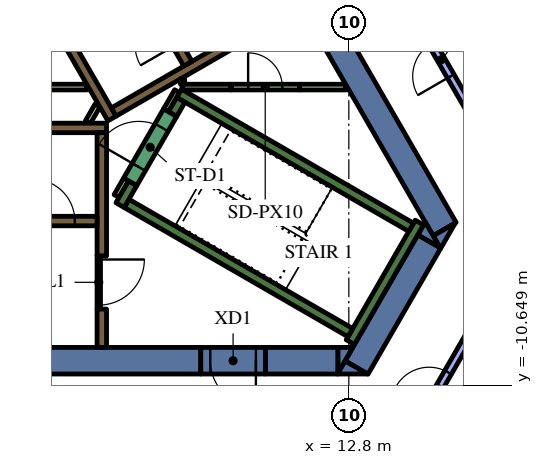
"""IFC4 building model, lengths in metres.
Left out: names, types, materials, properties, quantities, classifications, styles, units other than length and angle.
Written with IfcOpenShell. Run it as: python <this file> out.ifc"""

import sys

from ifc_helpers import new_model, si_unit, direction, frame, frame_2d, origin, place, context, subcontext, project, spatial, polyline, rectangle, outline, extrude, element, fill, save


model = new_model("IFC4")
c1 = context("Model", 3, precision=1e-05, world=origin(), true_north=direction((0.0, 1.0)))
c2 = subcontext(c1, "Body", "Model", "MODEL_VIEW")
j1 = project(units=[si_unit("LENGTHUNIT", "METRE"), si_unit("PLANEANGLEUNIT", "RADIAN")], contexts=[c1])
p1 = place(None, origin())
s1 = spatial("IfcSite", under=j1, at=p1, CompositionType="ELEMENT")
p2 = place(p1, origin())
s2 = spatial("IfcBuilding", under=s1, at=p2, CompositionType="ELEMENT")
p3 = place(p2, frame((0.0, 0.0, 210.0)))
s3 = spatial("IfcBuildingStorey", under=s2, at=p3, CompositionType="ELEMENT", Elevation=210.0)
p4 = place(p3, frame((9.085, 4.264, 0.0), z_axis=(0.0, 0.0, 1.0), x_axis=(0.499998082512, -0.866026510844, 0.0)))
e1 = element("IfcWall", 1, at=p4, inside=s3, PredefinedType="SOLIDWALL", context=c2, shape_type="SweptSolid", body=[
    extrude(rectangle(XDim=12.472, YDim=0.7, at=frame_2d((6.236, 0.0))), origin(), (0.0, 0.0, 1.0), 4.2),
])
p5 = place(p3, origin())
e2 = element("IfcWall", 2, at=p5, inside=s3, PredefinedType="SOLIDWALL", context=c2, shape_type="SweptSolid", body=[
    extrude(outline(polyline([(15.213, -7.05), (15.019, -6.714), (15.601, -6.378), (15.213, -7.05)])), origin(), (0.0, 0.0, 1.0), 4.2),
])
p6 = place(p3, frame((13.003, -10.179, 0.0), z_axis=(0.0, 0.0, 1.0), x_axis=(0.499972675833, 0.866041178825, 0.0)))
e3 = element("IfcWall", 3, at=p6, inside=s3, PredefinedType="SOLIDWALL", context=c2, shape_type="SweptSolid", body=[
    extrude(rectangle(XDim=3.829, YDim=0.7, at=frame_2d((1.915, 0.0))), origin(), (0.0, 0.0, 1.0), 4.2),
])
e4 = element("IfcWall", 4, at=p5, inside=s3, PredefinedType="SOLIDWALL", context=c2, shape_type="SweptSolid", body=[
    extrude(outline(polyline([(12.698, -10.005), (13.296, -10.35), (12.5, -10.35), (12.698, -10.005)])), origin(), (0.0, 0.0, 1.0), 4.2),
])
e5 = element("IfcWall", 5, at=p5, inside=s3, PredefinedType="SOLIDWALL", context=c2, shape_type="SweptSolid", body=[
    extrude(outline(polyline([(14.809, -6.35), (15.197, -7.022), (14.615, -6.686), (14.809, -6.35)])), origin(), (0.0, 0.0, 1.0), 4.2),
])
p7 = place(p3, frame((10.604, -10.0, 0.0), z_axis=(0.0, 0.0, 1.0), x_axis=(1.0, 0.0, 0.0)))
e6 = element("IfcWall", 6, at=p7, inside=s3, PredefinedType="SOLIDWALL", context=c2, shape_type="SweptSolid", body=[
    extrude(rectangle(XDim=1.909, YDim=0.7, at=frame_2d((0.955, 0.0))), origin(), (0.0, 0.0, 1.0), 4.2),
])
e7 = element("IfcWall", 7, at=p5, inside=s3, PredefinedType="SOLIDWALL", context=c2, shape_type="SweptSolid", body=[
    extrude(outline(polyline([(12.904, -9.65), (12.516, -10.322), (12.516, -9.65), (12.904, -9.65)])), origin(), (0.0, 0.0, 1.0), 4.2),
])
p8 = place(p3, frame((-10.556, -10.0, 0.0), z_axis=(0.0, 0.0, 1.0), x_axis=(1.0, 0.0, 0.0)))
e8 = element("IfcWall", 8, at=p8, inside=s3, PredefinedType="SOLIDWALL", context=c2, shape_type="SweptSolid", body=[
    extrude(rectangle(XDim=19.461, YDim=0.7, at=frame_2d((9.73, 0.0))), origin(), (0.0, 0.0, 1.0), 4.2),
])
p9 = place(p3, frame((12.84, -9.511, 0.0), z_axis=(0.0, 0.0, 1.0), x_axis=(0.500048121057, 0.865997619297, 0.0)))
e9 = element("IfcWall", 9, at=p9, inside=s3, PredefinedType="SOLIDWALL", context=c2, shape_type="SweptSolid", body=[
    extrude(rectangle(XDim=3.634, YDim=0.25, at=frame_2d((1.817, 0.0))), origin(), (0.0, 0.0, 1.0), 4.2),
])
p10 = place(p3, frame((12.84, -9.261, 0.0), z_axis=(0.0, 0.0, 1.0), x_axis=(-0.866013990052, 0.500019768644, 0.0)))
e10 = element("IfcWall", 10, at=p10, inside=s3, PredefinedType="SOLIDWALL", context=c2, shape_type="SweptSolid", body=[
    extrude(rectangle(XDim=6.8, YDim=0.25, at=frame_2d((3.4, 0.0))), origin(), (0.0, 0.0, 1.0), 4.2),
])
p11 = place(p3, frame((7.113, -5.33, 0.0), z_axis=(0.0, 0.0, 1.0), x_axis=(-0.499965889992, -0.866045096311, 0.0)))
e11 = element("IfcWall", 11, at=p11, inside=s3, PredefinedType="SOLIDWALL", context=c2, shape_type="SweptSolid", body=[
    extrude(rectangle(XDim=0.666, YDim=0.25, at=frame_2d((0.333, 0.0))), origin(), (0.0, 0.0, 1.0), 4.2),
])
p12 = place(p3, frame((8.334, -2.964, 0.0), z_axis=(0.0, 0.0, 1.0), x_axis=(0.866016039709, -0.500016218704, 0.0)))
e12 = element("IfcWall", 12, at=p12, inside=s3, PredefinedType="SOLIDWALL", context=c2, shape_type="SweptSolid", body=[
    extrude(rectangle(XDim=7.05, YDim=0.25, at=frame_2d((3.525, 0.0))), origin(), (0.0, 0.0, 1.0), 4.2),
])
p13 = place(p3, frame((8.163, -3.511, 0.0), z_axis=(0.0, 0.0, 1.0), x_axis=(0.500127794843, 0.865951608824, 0.0)))
e13 = element("IfcWall", 13, at=p13, inside=s3, PredefinedType="SOLIDWALL", context=c2, shape_type="SweptSolid", body=[
    extrude(rectangle(XDim=0.435, YDim=0.25, at=frame_2d((0.217, 0.0))), origin(), (0.0, 0.0, 1.0), 4.2),
])
p14 = place(p3, frame((-5.806, -3.875, 0.0), z_axis=(0.0, 0.0, 1.0), x_axis=(1.0, 0.0, 0.0)))
e14 = element("IfcWall", 14, at=p14, inside=s3, PredefinedType="SOLIDWALL", context=c2, shape_type="SweptSolid", body=[
    extrude(rectangle(XDim=12.231, YDim=0.25, at=frame_2d((6.116, 0.0))), origin(), (0.0, 0.0, 1.0), 4.2),
])
p15 = place(p3, frame((6.3, -7.24, 0.0), z_axis=(0.0, 0.0, 1.0), x_axis=(0.0, 1.0, 0.0)))
e15 = element("IfcWall", 15, at=p15, inside=s3, PredefinedType="SOLIDWALL", context=c2, shape_type="SweptSolid", body=[
    extrude(rectangle(XDim=3.24, YDim=0.25, at=frame_2d((1.62, 0.0))), origin(), (0.0, 0.0, 1.0), 4.2),
])
p16 = place(p3, frame((6.3, -9.65, 0.0), z_axis=(0.0, 0.0, 1.0), x_axis=(0.0, 1.0, 0.0)))
e16 = element("IfcWall", 16, at=p16, inside=s3, PredefinedType="SOLIDWALL", context=c2, shape_type="SweptSolid", body=[
    extrude(rectangle(XDim=1.008, YDim=0.25, at=frame_2d((0.504, 0.0))), origin(), (0.0, 0.0, 1.0), 4.2),
])
e17 = element("IfcWall", 17, at=p5, inside=s3, PredefinedType="SOLIDWALL", context=c2, shape_type="SweptSolid", body=[
    extrude(outline(polyline([(0.332, 6.925), (0.335, 6.925), (0.335, 6.925), (0.335, 6.925), (0.335, 7.075), (0.335, 7.075), (0.335, 7.075), (0.245, 7.075), (0.035, 7.439), (0.252, 7.564), (0.377, 7.348), (1.512, 5.382), (1.637, 5.165), (2.221, 4.153), (2.771, 3.199), (2.896, 2.983), (3.138, 2.564), (4.031, 1.017), (4.156, 0.801), (5.292, -1.165), (5.417, -1.382), (6.073, -2.519), (6.552, -3.348), (6.677, -3.564), (6.46, -3.689), (0.332, 6.925)])), origin(), (0.0, 0.0, 1.0), 4.2),
])
p17 = place(p3, frame((11.507, -0.631, 0.0), z_axis=(0.0, 0.0, 1.0), x_axis=(-0.866011447264, -0.500024172624, 0.0)))
e18 = element("IfcWall", 18, at=p17, inside=s3, PredefinedType="SOLIDWALL", context=c2, shape_type="SweptSolid", body=[
    extrude(rectangle(XDim=5.65, YDim=0.25, at=frame_2d((2.825, 0.0))), origin(), (0.0, 0.0, 1.0), 4.2),
])
p18 = place(p3, frame((3.238, -2.8, 0.0), z_axis=(0.0, 0.0, 1.0), x_axis=(1.0, 0.0, 0.0)))
e19 = element("IfcWall", 19, at=p18, inside=s3, PredefinedType="PARTITIONING", context=c2, shape_type="SweptSolid", body=[
    extrude(rectangle(XDim=2.672, YDim=0.15, at=frame_2d((1.336, 0.0))), origin(), (0.0, 0.0, 1.0), 3.45),
])
p19 = place(p3, frame((8.412, -2.8, 0.0), z_axis=(0.0, 0.0, 1.0), x_axis=(1.0, 0.0, 0.0)))
e20 = element("IfcWall", 20, at=p19, inside=s3, PredefinedType="PARTITIONING", context=c2, shape_type="SweptSolid", body=[
    extrude(rectangle(XDim=1.288, YDim=0.15, at=frame_2d((0.644, 0.0))), origin(), (0.0, 0.0, 1.0), 4.2),
])
p20 = place(p3, frame((8.37, -2.65, 0.0), z_axis=(0.0, 0.0, 1.0), x_axis=(1.0, 0.0, 0.0)))
e21 = element("IfcWall", 21, at=p20, inside=s3, PredefinedType="PARTITIONING", context=c2, shape_type="SweptSolid", body=[
    extrude(rectangle(XDim=0.108, YDim=0.15, at=frame_2d((0.054, 0.0))), origin(), (0.0, 0.0, 1.0), 4.2),
])
p21 = place(p3, frame((8.281, -2.907, 0.0), z_axis=(0.0, 0.0, 1.0), x_axis=(-0.500193841991, -0.86591346013, 0.0)))
e22 = element("IfcWall", 22, at=p21, inside=s3, PredefinedType="PARTITIONING", context=c2, shape_type="SweptSolid", body=[
    extrude(rectangle(XDim=0.583, YDim=0.15, at=frame_2d((0.292, 0.0))), origin(), (0.0, 0.0, 1.0), 4.2),
])
p22 = place(p3, frame((11.5, -2.801, 0.0), z_axis=(0.0, 0.0, 1.0), x_axis=(1.0, 0.0, 0.0)))
e23 = element("IfcWall", 23, at=p22, inside=s3, PredefinedType="PARTITIONING", context=c2, shape_type="SweptSolid", body=[
    extrude(rectangle(XDim=1.222, YDim=0.15, at=frame_2d((0.611, 0.0))), origin(), (0.0, 0.0, 1.0), 3.45),
])
p23 = place(p3, frame((6.688, -5.667, 0.0), z_axis=(0.0, 0.0, 1.0), x_axis=(0.499834152157, 0.86612113491, 0.0)))
e24 = element("IfcWall", 24, at=p23, inside=s3, PredefinedType="PARTITIONING", context=c2, shape_type="SweptSolid", body=[
    extrude(rectangle(XDim=0.505, YDim=0.15, at=frame_2d((0.252, 0.0))), origin(), (0.0, 0.0, 1.0), 3.45),
])
p24 = place(p3, frame((5.936, -3.718, 0.0), z_axis=(0.0, 0.0, 1.0), x_axis=(0.499890179513, 0.866088799389, 0.0)))
e25 = element("IfcWall", 25, at=p24, inside=s3, PredefinedType="PARTITIONING", context=c2, shape_type="SweptSolid", body=[
    extrude(rectangle(XDim=0.504, YDim=0.15, at=frame_2d((0.252, 0.0))), origin(), (0.0, 0.0, 1.0), 3.45),
])
p25 = place(p3, frame((-6.175, -6.325, 0.0), z_axis=(0.0, 0.0, 1.0), x_axis=(1.0, 0.0, 0.0)))
e26 = element("IfcWall", 26, at=p25, inside=s3, PredefinedType="SOLIDWALL", context=c2, shape_type="SweptSolid", body=[
    extrude(rectangle(XDim=12.35, YDim=0.25, at=frame_2d((6.175, 0.0))), origin(), (0.0, 0.0, 1.0), 4.2),
])
p26 = place(p25, frame((0.585, 0.0, 0.0)))
e27 = element("IfcOpeningElement", 27, at=p26, cuts=e26, PredefinedType="OPENING", context=c2, shape_type="SweptSolid", body=[
    extrude(rectangle(XDim=1.1, YDim=2.1, at=frame_2d((0.55, 1.05))), frame((0.0, 0.135, 0.0), z_axis=(0.0, -1.0, 0.0), x_axis=(1.0, 0.0, 0.0)), (0.0, 0.0, 1.0), 0.27),
])
p27 = place(p25, frame((3.105, 0.0, 0.0)))
e28 = element("IfcOpeningElement", 28, at=p27, cuts=e26, PredefinedType="OPENING", context=c2, shape_type="SweptSolid", body=[
    extrude(rectangle(XDim=1.1, YDim=2.1, at=frame_2d((0.55, 1.05))), frame((0.0, 0.135, 0.0), z_axis=(0.0, -1.0, 0.0), x_axis=(1.0, 0.0, 0.0)), (0.0, 0.0, 1.0), 0.27),
])
p28 = place(p25, frame((5.625, 0.0, 0.0)))
e29 = element("IfcOpeningElement", 29, at=p28, cuts=e26, PredefinedType="OPENING", context=c2, shape_type="SweptSolid", body=[
    extrude(rectangle(XDim=1.1, YDim=2.1, at=frame_2d((0.55, 1.05))), frame((0.0, 0.135, 0.0), z_axis=(0.0, -1.0, 0.0), x_axis=(1.0, 0.0, 0.0)), (0.0, 0.0, 1.0), 0.27),
])
p29 = place(p25, frame((8.145, 0.0, 0.0)))
e30 = element("IfcOpeningElement", 30, at=p29, cuts=e26, PredefinedType="OPENING", context=c2, shape_type="SweptSolid", body=[
    extrude(rectangle(XDim=1.1, YDim=2.1, at=frame_2d((0.55, 1.05))), frame((0.0, 0.135, 0.0), z_axis=(0.0, -1.0, 0.0), x_axis=(1.0, 0.0, 0.0)), (0.0, 0.0, 1.0), 0.27),
])
p30 = place(p25, frame((10.665, 0.0, 0.0)))
e31 = element("IfcOpeningElement", 31, at=p30, cuts=e26, PredefinedType="OPENING", context=c2, shape_type="SweptSolid", body=[
    extrude(rectangle(XDim=1.1, YDim=2.1, at=frame_2d((0.55, 1.05))), frame((0.0, 0.135, 0.0), z_axis=(0.0, -1.0, 0.0), x_axis=(1.0, 0.0, 0.0)), (0.0, 0.0, 1.0), 0.27),
])
p31 = place(p3, frame((8.565, -2.185, 0.0), z_axis=(0.0, 0.0, 1.0), x_axis=(-0.499997954832, 0.866026584559, 0.0)))
e32 = element("IfcWall", 32, at=p31, inside=s3, PredefinedType="SOLIDWALL", context=c2, shape_type="SweptSolid", body=[
    extrude(rectangle(XDim=12.35, YDim=0.25, at=frame_2d((6.175, 0.0))), origin(), (0.0, 0.0, 1.0), 4.2),
])
p32 = place(p31, frame((0.585, 0.0, 0.0)))
e33 = element("IfcOpeningElement", 33, at=p32, cuts=e32, PredefinedType="OPENING", context=c2, shape_type="SweptSolid", body=[
    extrude(rectangle(XDim=1.1, YDim=2.1, at=frame_2d((0.55, 1.05))), frame((0.0, 0.135, 0.0), z_axis=(0.0, -1.0, 0.0), x_axis=(1.0, 0.0, 0.0)), (0.0, 0.0, 1.0), 0.27),
])
p33 = place(p3, frame((7.048, -5.292, 0.0), z_axis=(0.0, 0.0, 1.0), x_axis=(0.49994051562, 0.866059744384, 0.0)))
e34 = element("IfcWall", 34, at=p33, inside=s3, PredefinedType="SOLIDWALL", context=c2, shape_type="SweptSolid", body=[
    extrude(rectangle(XDim=2.1, YDim=0.4, at=frame_2d((1.05, 0.0))), origin(), (0.0, 0.0, 1.0), 4.2),
])
p34 = place(p33, frame((0.45, 0.0, 0.0)))
e35 = element("IfcOpeningElement", 35, at=p34, cuts=e34, PredefinedType="OPENING", context=c2, shape_type="SweptSolid", body=[
    extrude(rectangle(XDim=1.2, YDim=2.1, at=frame_2d((0.6, 1.05))), frame((0.0, 0.21, 0.0), z_axis=(0.0, -1.0, 0.0), x_axis=(1.0, 0.0, 0.0)), (0.0, 0.0, 1.0), 0.42),
])
p35 = place(p3, frame((6.22, -7.237, 0.0), z_axis=(0.0, 0.0, 1.0), x_axis=(0.0, -1.0, 0.0)))
e36 = element("IfcWall", 36, at=p35, inside=s3, PredefinedType="PARTITIONING", context=c2, shape_type="SweptSolid", body=[
    extrude(rectangle(XDim=1.4, YDim=0.09, at=frame_2d((0.7, 0.0))), origin(), (0.0, 0.0, 1.0), 3.45),
])
p36 = place(p35, frame((0.1, 0.0, 0.0)))
e37 = element("IfcOpeningElement", 37, at=p36, cuts=e36, PredefinedType="OPENING", context=c2, shape_type="SweptSolid", body=[
    extrude(rectangle(XDim=1.2, YDim=2.1, at=frame_2d((0.6, 1.05))), frame((0.0, 0.055, 0.0), z_axis=(0.0, -1.0, 0.0), x_axis=(1.0, 0.0, 0.0)), (0.0, 0.0, 1.0), 0.11),
])
p37 = place(p3, frame((10.604, -10.0, 0.0), z_axis=(0.0, 0.0, 1.0), x_axis=(-1.0, 0.0, 0.0)))
e38 = element("IfcWall", 38, at=p37, inside=s3, PredefinedType="SOLIDWALL", context=c2, shape_type="SweptSolid", body=[
    extrude(rectangle(XDim=1.7, YDim=0.7, at=frame_2d((0.85, 0.0))), origin(), (0.0, 0.0, 1.0), 4.2),
])
p38 = place(p37, frame((0.25, 0.0, 0.0)))
e39 = element("IfcOpeningElement", 39, at=p38, cuts=e38, PredefinedType="OPENING", context=c2, shape_type="SweptSolid", body=[
    extrude(rectangle(XDim=1.2, YDim=2.1, at=frame_2d((0.6, 1.05))), frame((0.0, 0.36, 0.0), z_axis=(0.0, -1.0, 0.0), x_axis=(1.0, 0.0, 0.0)), (0.0, 0.0, 1.0), 0.72),
])
p39 = place(p3, frame((9.7, -2.8, 0.0), z_axis=(0.0, 0.0, 1.0), x_axis=(1.0, 0.0, 0.0)))
e40 = element("IfcWall", 40, at=p39, inside=s3, PredefinedType="PARTITIONING", context=c2, shape_type="SweptSolid", body=[
    extrude(rectangle(XDim=1.8, YDim=0.15, at=frame_2d((0.9, 0.0))), origin(), (0.0, 0.0, 1.0), 3.45),
])
p40 = place(p39, frame((0.45, 0.0, 0.0)))
e41 = element("IfcOpeningElement", 41, at=p40, cuts=e40, PredefinedType="OPENING", context=c2, shape_type="SweptSolid", body=[
    extrude(rectangle(XDim=0.9, YDim=2.1, at=frame_2d((0.45, 1.05))), frame((0.0, 0.085, 0.0), z_axis=(0.0, -1.0, 0.0), x_axis=(1.0, 0.0, 0.0)), (0.0, 0.0, 1.0), 0.17),
])
p41 = place(p3, frame((14.362, -12.124, 0.0), z_axis=(0.0, 0.0, 1.0), x_axis=(0.500022299258, 0.866012528919, 0.0)))
e42 = element("IfcWall", 42, at=p41, inside=s3, PredefinedType="PARTITIONING", context=c2, shape_type="SweptSolid", body=[
    extrude(rectangle(XDim=3.219, YDim=0.2, at=frame_2d((1.609, 0.0))), origin(), (0.0, 0.0, 1.0), 3.45),
])
p42 = place(p41, frame((1.1, 0.0, 0.0)))
e43 = element("IfcOpeningElement", 43, at=p42, cuts=e42, PredefinedType="OPENING", context=c2, shape_type="SweptSolid", body=[
    extrude(rectangle(XDim=1.0, YDim=2.1, at=frame_2d((0.5, 1.05))), frame((0.0, 0.11, 0.0), z_axis=(0.0, -1.0, 0.0), x_axis=(1.0, 0.0, 0.0)), (0.0, 0.0, 1.0), 0.22),
])
p43 = place(p3, frame((17.681, -6.324, 0.0), z_axis=(0.0, 0.0, 1.0), x_axis=(-0.500021153861, 0.866013190252, 0.0)))
e44 = element("IfcWall", 44, at=p43, inside=s3, PredefinedType="PARTITIONING", context=c2, shape_type="SweptSolid", body=[
    extrude(rectangle(XDim=9.787, YDim=0.2, at=frame_2d((4.894, 0.0))), origin(), (0.0, 0.0, 1.0), 3.45),
])
p44 = place(p43, frame((4.4, 0.0, 0.0)))
e45 = element("IfcOpeningElement", 45, at=p44, cuts=e44, PredefinedType="OPENING", context=c2, shape_type="SweptSolid", body=[
    extrude(rectangle(XDim=1.0, YDim=2.1, at=frame_2d((0.5, 1.05))), frame((0.0, 0.11, 0.0), z_axis=(0.0, -1.0, 0.0), x_axis=(1.0, 0.0, 0.0)), (0.0, 0.0, 1.0), 0.22),
])
p45 = place(p30, origin())
e46 = element("IfcDoor", 46, at=p45, inside=s3, OperationType="DOUBLE_DOOR_SLIDING", PredefinedType="DOOR", context=c2, shape_type="SweptSolid", body=[
    extrude(rectangle(XDim=1.1, YDim=2.1, at=frame_2d((0.55, 1.05))), frame((0.0, 0.025, 0.0), z_axis=(0.0, -1.0, 0.0), x_axis=(1.0, 0.0, 0.0)), (0.0, 0.0, 1.0), 0.05),
])
fill(e31, e46)
p46 = place(p34, origin())
e47 = element("IfcDoor", 47, at=p46, inside=s3, OperationType="SINGLE_SWING_LEFT", PredefinedType="DOOR", context=c2, shape_type="SweptSolid", body=[
    extrude(rectangle(XDim=1.2, YDim=2.1, at=frame_2d((0.6, 1.05))), frame((0.0, 0.025, 0.0), z_axis=(0.0, -1.0, 0.0), x_axis=(1.0, 0.0, 0.0)), (0.0, 0.0, 1.0), 0.05),
])
fill(e35, e47)
p47 = place(p36, origin())
e48 = element("IfcDoor", 48, at=p47, inside=s3, OperationType="SINGLE_SWING_LEFT", PredefinedType="DOOR", context=c2, shape_type="SweptSolid", body=[
    extrude(rectangle(XDim=1.2, YDim=2.1, at=frame_2d((0.6, 1.05))), frame((0.0, 0.025, 0.0), z_axis=(0.0, -1.0, 0.0), x_axis=(1.0, 0.0, 0.0)), (0.0, 0.0, 1.0), 0.05),
])
fill(e37, e48)
p48 = place(p38, origin())
e49 = element("IfcDoor", 49, at=p48, inside=s3, OperationType="SINGLE_SWING_LEFT", PredefinedType="DOOR", context=c2, shape_type="SweptSolid", body=[
    extrude(rectangle(XDim=1.2, YDim=2.1, at=frame_2d((0.6, 1.05))), frame((0.0, 0.025, 0.0), z_axis=(0.0, -1.0, 0.0), x_axis=(1.0, 0.0, 0.0)), (0.0, 0.0, 1.0), 0.05),
])
fill(e39, e49)
p49 = place(p40, origin())
e50 = element("IfcDoor", 50, at=p49, inside=s3, OperationType="SINGLE_SWING_LEFT", PredefinedType="DOOR", context=c2, shape_type="SweptSolid", body=[
    extrude(rectangle(XDim=0.9, YDim=2.1, at=frame_2d((0.45, 1.05))), frame((0.0, 0.025, 0.0), z_axis=(0.0, -1.0, 0.0), x_axis=(1.0, 0.0, 0.0)), (0.0, 0.0, 1.0), 0.05),
])
fill(e41, e50)
p50 = place(p42, origin())
e51 = element("IfcDoor", 51, at=p50, inside=s3, OperationType="SINGLE_SWING_LEFT", PredefinedType="DOOR", context=c2, shape_type="SweptSolid", body=[
    extrude(rectangle(XDim=1.0, YDim=2.1, at=frame_2d((0.5, 1.05))), frame((0.0, 0.025, 0.0), z_axis=(0.0, -1.0, 0.0), x_axis=(1.0, 0.0, 0.0)), (0.0, 0.0, 1.0), 0.05),
])
fill(e43, e51)
p51 = place(p44, origin())
e52 = element("IfcDoor", 52, at=p51, inside=s3, OperationType="SINGLE_SWING_RIGHT", PredefinedType="DOOR", context=c2, shape_type="SweptSolid", body=[
    extrude(rectangle(XDim=1.0, YDim=2.1, at=frame_2d((0.5, 1.05))), frame((0.0, 0.025, 0.0), z_axis=(0.0, -1.0, 0.0), x_axis=(1.0, 0.0, 0.0)), (0.0, 0.0, 1.0), 0.05),
])
fill(e45, e52)
save(model, sys.argv[1])
